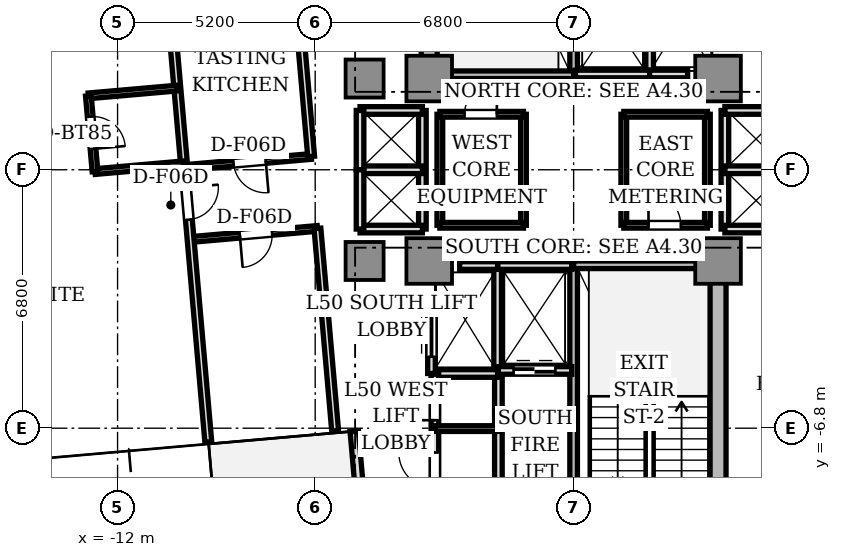
"""IFC4 building model, lengths in metres.
Left out: names, types, materials, properties, quantities, classifications, styles, units other than length and angle.
Written with IfcOpenShell. Run it as: python <this file> out.ifc"""

import sys

from ifc_helpers import new_model, si_unit, direction, frame, frame_2d, origin, origin_2d, place, context, subcontext, project, spatial, rectangle, extrude, source, transform, mapped, element, fill, save


model = new_model("IFC4")
c1 = context("Model", 3, precision=1e-05, world=origin(), true_north=direction((0.0, 1.0)))
c2 = subcontext(c1, "Body", "Model", "MODEL_VIEW")
j1 = project(units=[si_unit("LENGTHUNIT", "METRE"), si_unit("PLANEANGLEUNIT", "RADIAN")], contexts=[c1])
p1 = place(None, origin())
s1 = spatial("IfcSite", under=j1, at=p1, CompositionType="ELEMENT")
p2 = place(p1, origin())
s2 = spatial("IfcBuilding", under=s1, at=p2, CompositionType="ELEMENT")
p3 = place(p2, frame((0.0, 0.0, 181.9)))
s3 = spatial("IfcBuildingStorey", under=s2, at=p3, CompositionType="ELEMENT", Elevation=181.9)
for number, where, z_axis, x_axis in (
    (1, (-3.8, 2.85, 0.0), (0.0, 0.0, 1.0), (0.0, 1.0, 0.0)),
    (2, (3.8, -9.75, 0.0), (0.0, 0.0, 1.0), (0.0, 1.0, 0.0)),
):
    element("IfcWall", number, at=place(p3, frame(where, z_axis=z_axis, x_axis=x_axis)), inside=s3, PredefinedType="SHEAR", context=c2, shape_type="SweptSolid", body=[
        extrude(rectangle(XDim=6.9, YDim=0.42, at=frame_2d((3.45, 0.0))), origin(), (0.0, 0.0, 1.0), 3.11),
    ])
m1 = source(origin(), c2, "Body", "SweptSolid", [
    extrude(rectangle(XDim=1.2, YDim=1.2, at=origin_2d()), origin(), (0.0, 0.0, 1.0), 3.11),
])
for number, where, z_axis, x_axis in (
    (3, (-3.8, 2.4, 0.0), (0.0, 0.0, 1.0), (1.0, 0.0, 0.0)),
    (4, (3.8, 2.4, 0.0), (0.0, 0.0, 1.0), (1.0, 0.0, 0.0)),
    (5, (-3.8, -2.4, 0.0), (0.0, 0.0, 1.0), (1.0, 0.0, 0.0)),
    (6, (3.8, -2.4, 0.0), (0.0, 0.0, 1.0), (1.0, 0.0, 0.0)),
):
    element("IfcColumn", number, at=place(p3, frame(where, z_axis=z_axis, x_axis=x_axis)), inside=s3, PredefinedType="COLUMN", context=c2, shape_type="MappedRepresentation", body=[
        mapped(m1, transform((0.0, 0.0, 0.0), scale=1.0)),
    ])
m2 = source(origin(), c2, "Body", "SweptSolid", [
    extrude(rectangle(XDim=1.0, YDim=1.0, at=origin_2d()), origin(), (0.0, 0.0, 1.0), 3.11),
])
for number, where, z_axis, x_axis in (
    (7, (-5.5, 2.4, 0.0), (0.0, 0.0, 1.0), (1.0, 0.0, 0.0)),
    (8, (-5.5, -2.4, 0.0), (0.0, 0.0, 1.0), (1.0, 0.0, 0.0)),
):
    element("IfcColumn", number, at=place(p3, frame(where, z_axis=z_axis, x_axis=x_axis)), inside=s3, PredefinedType="COLUMN", context=c2, shape_type="MappedRepresentation", body=[
        mapped(m2, transform((0.0, 0.0, 0.0), scale=1.0)),
    ])
p4 = place(p3, frame((-5.772, -6.879, 0.0), z_axis=(0.0, 0.0, 1.0), x_axis=(0.087168071984, -0.996193619346, 0.0)))
e9 = element("IfcWall", 9, at=p4, inside=s3, PredefinedType="STANDARD", context=c2, shape_type="SweptSolid", body=[
    extrude(rectangle(XDim=2.7, YDim=0.22, at=frame_2d((1.35, 0.0))), origin(), (0.0, 0.0, 1.0), 3.11),
])
p5 = place(p4, frame((1.4, 0.0, 0.0)))
e10 = element("IfcOpeningElement", 10, at=p5, cuts=e9, PredefinedType="OPENING", context=c2, shape_type="SweptSolid", body=[
    extrude(rectangle(XDim=1.0, YDim=2.2, at=frame_2d((0.5, 1.1))), frame((0.0, 0.12, 0.0), z_axis=(0.0, -1.0, 0.0), x_axis=(1.0, 0.0, 0.0)), (0.0, 0.0, 1.0), 0.24),
])
p6 = place(p3, frame((0.0, 2.5, 0.0), z_axis=(0.0, 0.0, 1.0), x_axis=(0.0, 1.0, 0.0)))
e11 = element("IfcWall", 11, at=p6, inside=s3, PredefinedType="SOLIDWALL", context=c2, shape_type="SweptSolid", body=[
    extrude(rectangle(XDim=7.68, YDim=0.2, at=frame_2d((3.84, 0.0))), origin(), (0.0, 0.0, 1.0), 3.11),
])
p7 = place(p6, frame((6.36, 0.0, 0.0)))
e12 = element("IfcOpeningElement", 12, at=p7, cuts=e11, PredefinedType="OPENING", context=c2, shape_type="SweptSolid", body=[
    extrude(rectangle(XDim=1.1, YDim=2.15, at=frame_2d((0.55, 1.075))), frame((0.0, 0.11, 0.0), z_axis=(0.0, -1.0, 0.0), x_axis=(1.0, 0.0, 0.0)), (0.0, 0.0, 1.0), 0.22),
])
p8 = place(p3, frame((-3.72, 2.5, 0.0), z_axis=(0.0, 0.0, 1.0), x_axis=(1.0, 0.0, 0.0)))
e13 = element("IfcWall", 13, at=p8, inside=s3, PredefinedType="SOLIDWALL", context=c2, shape_type="SweptSolid", body=[
    extrude(rectangle(XDim=3.72, YDim=0.2, at=frame_2d((1.86, 0.0))), origin(), (0.0, 0.0, 1.0), 3.11),
])
p9 = place(p3, frame((0.0, -10.18, 0.0), z_axis=(0.0, 0.0, 1.0), x_axis=(0.0, 1.0, 0.0)))
e14 = element("IfcWall", 14, at=p9, inside=s3, PredefinedType="SOLIDWALL", context=c2, shape_type="SweptSolid", body=[
    extrude(rectangle(XDim=7.68, YDim=0.2, at=frame_2d((3.84, 0.0))), origin(), (0.0, 0.0, 1.0), 3.11),
])
p10 = place(p9, frame((0.28, 0.0, 0.0)))
e15 = element("IfcOpeningElement", 15, at=p10, cuts=e14, PredefinedType="OPENING", context=c2, shape_type="SweptSolid", body=[
    extrude(rectangle(XDim=1.1, YDim=2.15, at=frame_2d((0.55, 1.075))), frame((0.0, 0.11, 0.0), z_axis=(0.0, -1.0, 0.0), x_axis=(1.0, 0.0, 0.0)), (0.0, 0.0, 1.0), 0.22),
])
p11 = place(p3, frame((0.0, -2.5, 0.0), z_axis=(0.0, 0.0, 1.0), x_axis=(1.0, 0.0, 0.0)))
e16 = element("IfcWall", 16, at=p11, inside=s3, PredefinedType="SOLIDWALL", context=c2, shape_type="SweptSolid", body=[
    extrude(rectangle(XDim=3.72, YDim=0.2, at=frame_2d((1.86, 0.0))), origin(), (0.0, 0.0, 1.0), 3.11),
])
p12 = place(p3, frame((-1.98, -9.98, 0.0), z_axis=(0.0, 0.0, 1.0), x_axis=(0.0, 1.0, 0.0)))
e17 = element("IfcWall", 17, at=p12, inside=s3, PredefinedType="SOLIDWALL", context=c2, shape_type="SweptSolid", body=[
    extrude(rectangle(XDim=4.66, YDim=0.2, at=frame_2d((2.33, 0.0))), origin(), (0.0, 0.0, 1.0), 2.66),
])
p13 = place(p12, frame((0.2, 0.0, 0.0)))
e18 = element("IfcOpeningElement", 18, at=p13, cuts=e17, PredefinedType="OPENING", context=c2, shape_type="SweptSolid", body=[
    extrude(rectangle(XDim=0.85, YDim=2.1, at=frame_2d((0.425, 1.05))), frame((0.0, 0.11, 0.0), z_axis=(0.0, -1.0, 0.0), x_axis=(1.0, 0.0, 0.0)), (0.0, 0.0, 1.0), 0.22),
])
p14 = place(p3, frame((2.0, 2.5, 0.0), z_axis=(0.0, 0.0, 1.0), x_axis=(0.0, 1.0, 0.0)))
e19 = element("IfcWall", 19, at=p14, inside=s3, PredefinedType="SOLIDWALL", context=c2, shape_type="SweptSolid", body=[
    extrude(rectangle(XDim=2.78, YDim=0.2, at=frame_2d((1.39, 0.0))), origin(), (0.0, 0.0, 1.0), 2.66),
])
p15 = place(p3, frame((0.05, 2.52, 0.0), z_axis=(0.0, 0.0, 1.0), x_axis=(1.0, 0.0, 0.0)))
e20 = element("IfcWall", 20, at=p15, inside=s3, PredefinedType="SOLIDWALL", context=c2, shape_type="SweptSolid", body=[
    extrude(rectangle(XDim=1.95, YDim=0.2, at=frame_2d((0.975, 0.0))), origin(), (0.0, 0.0, 1.0), 2.66),
])
p16 = place(p3, frame((-2.0, -5.28, 0.0), z_axis=(0.0, 0.0, 1.0), x_axis=(0.0, 1.0, 0.0)))
e21 = element("IfcWall", 21, at=p16, inside=s3, PredefinedType="SOLIDWALL", context=c2, shape_type="SweptSolid", body=[
    extrude(rectangle(XDim=2.78, YDim=0.2, at=frame_2d((1.39, 0.0))), origin(), (0.0, 0.0, 1.0), 2.66),
])
p17 = place(p3, frame((-2.0, -2.52, 0.0), z_axis=(0.0, 0.0, 1.0), x_axis=(1.0, 0.0, 0.0)))
e22 = element("IfcWall", 22, at=p17, inside=s3, PredefinedType="SOLIDWALL", context=c2, shape_type="SweptSolid", body=[
    extrude(rectangle(XDim=1.95, YDim=0.2, at=frame_2d((0.975, 0.0))), origin(), (0.0, 0.0, 1.0), 2.66),
])
p18 = place(p3, frame((-1.98, -5.28, 0.0), z_axis=(0.0, 0.0, 1.0), x_axis=(1.0, 0.0, 0.0)))
e23 = element("IfcWall", 23, at=p18, inside=s3, PredefinedType="SOLIDWALL", context=c2, shape_type="SweptSolid", body=[
    extrude(rectangle(XDim=1.93, YDim=0.2, at=frame_2d((0.965, 0.0))), origin(), (0.0, 0.0, 1.0), 2.66),
])
p19 = place(p18, frame((0.4, 0.0, 0.0)))
e24 = element("IfcOpeningElement", 24, at=p19, cuts=e23, PredefinedType="OPENING", context=c2, shape_type="SweptSolid", body=[
    extrude(rectangle(XDim=1.1, YDim=2.2, at=frame_2d((0.55, 1.1))), frame((0.0, 0.11, 0.0), z_axis=(0.0, -1.0, 0.0), x_axis=(1.0, 0.0, 0.0)), (0.0, 0.0, 1.0), 0.22),
])
for number, where, z_axis, x_axis in (
    (25, (2.0, 2.52, 0.0), (0.0, 0.0, 1.0), (1.0, 0.0, 0.0)),
    (26, (-3.0, -2.52, 0.0), (0.0, 0.0, 1.0), (1.0, 0.0, 0.0)),
):
    element("IfcWall", number, at=place(p3, frame(where, z_axis=z_axis, x_axis=x_axis)), inside=s3, PredefinedType="SOLIDWALL", context=c2, shape_type="SweptSolid", body=[
        extrude(rectangle(XDim=1.0, YDim=0.2, at=frame_2d((0.5, 0.0))), origin(), (0.0, 0.0, 1.0), 2.66),
    ])
p20 = place(p3, frame((-3.74, -5.36, 0.0), z_axis=(0.0, 0.0, 1.0), x_axis=(1.0, 0.0, 0.0)))
e27 = element("IfcWall", 27, at=p20, inside=s3, PredefinedType="SOLIDWALL", context=c2, shape_type="SweptSolid", body=[
    extrude(rectangle(XDim=1.74, YDim=0.2, at=frame_2d((0.87, 0.0))), origin(), (0.0, 0.0, 1.0), 2.66),
])
p21 = place(p3, frame((-3.74, -5.36, 0.0), z_axis=(0.0, 0.0, 1.0), x_axis=(0.0, 1.0, 0.0)))
e28 = element("IfcWall", 28, at=p21, inside=s3, PredefinedType="SOLIDWALL", context=c2, shape_type="SweptSolid", body=[
    extrude(rectangle(XDim=2.08, YDim=0.2, at=frame_2d((1.04, 0.0))), origin(), (0.0, 0.0, 1.0), 2.66),
])
p22 = place(p21, frame((0.44, 0.0, 0.0)))
e29 = element("IfcOpeningElement", 29, at=p22, cuts=e28, PredefinedType="OPENING", context=c2, shape_type="SweptSolid", body=[
    extrude(rectangle(XDim=1.2, YDim=2.2, at=frame_2d((0.6, 1.1))), frame((0.0, 0.11, 0.0), z_axis=(0.0, -1.0, 0.0), x_axis=(1.0, 0.0, 0.0)), (0.0, 0.0, 1.0), 0.22),
])
p23 = place(p3, frame((3.98, -1.56, 0.0), z_axis=(0.0, 0.0, 1.0), x_axis=(0.0, 1.0, 0.0)))
e30 = element("IfcWall", 30, at=p23, inside=s3, PredefinedType="SOLIDWALL", context=c2, shape_type="SweptSolid", body=[
    extrude(rectangle(XDim=3.12, YDim=0.2, at=frame_2d((1.56, 0.0))), origin(), (0.0, 0.0, 1.0), 2.28),
])
for number, where, z_axis, x_axis in (
    (31, (3.98, 1.56, 0.0), (0.0, 0.0, 1.0), (1.0, 0.0, 0.0)),
    (32, (3.98, -1.56, 0.0), (0.0, 0.0, 1.0), (1.0, 0.0, 0.0)),
    (33, (3.98, 0.0, 0.0), (0.0, 0.0, 1.0), (1.0, 0.0, 0.0)),
):
    element("IfcWall", number, at=place(p3, frame(where, z_axis=z_axis, x_axis=x_axis)), inside=s3, PredefinedType="SOLIDWALL", context=c2, shape_type="SweptSolid", body=[
        extrude(rectangle(XDim=1.64, YDim=0.2, at=frame_2d((0.82, 0.0))), origin(), (0.0, 0.0, 1.0), 2.66),
    ])
p24 = place(p3, frame((-3.98, -1.56, 0.0), z_axis=(0.0, 0.0, 1.0), x_axis=(0.0, 1.0, 0.0)))
e34 = element("IfcWall", 34, at=p24, inside=s3, PredefinedType="SOLIDWALL", context=c2, shape_type="SweptSolid", body=[
    extrude(rectangle(XDim=3.12, YDim=0.2, at=frame_2d((1.56, 0.0))), origin(), (0.0, 0.0, 1.0), 2.28),
])
for number, where, z_axis, x_axis in (
    (35, (-5.62, 1.56, 0.0), (0.0, 0.0, 1.0), (1.0, 0.0, 0.0)),
    (36, (-5.62, -1.56, 0.0), (0.0, 0.0, 1.0), (1.0, 0.0, 0.0)),
    (37, (-5.62, 0.0, 0.0), (0.0, 0.0, 1.0), (1.0, 0.0, 0.0)),
):
    element("IfcWall", number, at=place(p3, frame(where, z_axis=z_axis, x_axis=x_axis)), inside=s3, PredefinedType="SOLIDWALL", context=c2, shape_type="SweptSolid", body=[
        extrude(rectangle(XDim=1.64, YDim=0.2, at=frame_2d((0.82, 0.0))), origin(), (0.0, 0.0, 1.0), 2.66),
    ])
for number, where, z_axis, x_axis in (
    (38, (-5.62, 0.0, 0.0), (0.0, 0.0, 1.0), (0.0, 1.0, 0.0)),
    (39, (-5.62, -1.56, 0.0), (0.0, 0.0, 1.0), (0.0, 1.0, 0.0)),
):
    element("IfcWall", number, at=place(p3, frame(where, z_axis=z_axis, x_axis=x_axis)), inside=s3, PredefinedType="SOLIDWALL", context=c2, shape_type="SweptSolid", body=[
        extrude(rectangle(XDim=1.56, YDim=0.2, at=frame_2d((0.78, 0.0))), origin(), (0.0, 0.0, 1.0), 2.66),
    ])
p25 = place(p3, frame((-3.65, -8.81, 0.0), z_axis=(0.0, 0.0, 1.0), x_axis=(0.0, 1.0, 0.0)))
e40 = element("IfcWall", 40, at=p25, inside=s3, PredefinedType="SOLIDWALL", context=c2, shape_type="SweptSolid", body=[
    extrude(rectangle(XDim=3.43, YDim=0.2, at=frame_2d((1.715, 0.0))), origin(), (0.0, 0.0, 1.0), 2.66),
])
p26 = place(p25, frame((0.42, 0.0, 0.0)))
e41 = element("IfcOpeningElement", 41, at=p26, cuts=e40, PredefinedType="OPENING", context=c2, shape_type="SweptSolid", body=[
    extrude(rectangle(XDim=0.95, YDim=2.15, at=frame_2d((0.475, 1.075))), frame((0.0, 0.11, 0.0), z_axis=(0.0, -1.0, 0.0), x_axis=(1.0, 0.0, 0.0)), (0.0, 0.0, 1.0), 0.22),
])
p27 = place(p25, frame((2.22, 0.0, 0.0)))
e42 = element("IfcOpeningElement", 42, at=p27, cuts=e40, PredefinedType="OPENING", context=c2, shape_type="SweptSolid", body=[
    extrude(rectangle(XDim=0.85, YDim=2.1, at=frame_2d((0.425, 1.05))), frame((0.0, 0.11, 0.0), z_axis=(0.0, -1.0, 0.0), x_axis=(1.0, 0.0, 0.0)), (0.0, 0.0, 1.0), 0.22),
])
p28 = place(p3, frame((-3.65, -6.81, 0.0), z_axis=(0.0, 0.0, 1.0), x_axis=(1.0, 0.0, 0.0)))
e43 = element("IfcWall", 43, at=p28, inside=s3, PredefinedType="PARTITIONING", context=c2, shape_type="SweptSolid", body=[
    extrude(rectangle(XDim=1.67, YDim=0.15, at=frame_2d((0.835, 0.0))), origin(), (0.0, 0.0, 1.0), 2.66),
])
p29 = place(p3, frame((-1.32, -1.46, 0.0), z_axis=(0.0, 0.0, 1.0), x_axis=(0.0, 1.0, 0.0)))
e44 = element("IfcWall", 44, at=p29, inside=s3, PredefinedType="PARTITIONING", context=c2, shape_type="SweptSolid", body=[
    extrude(rectangle(XDim=2.92, YDim=0.15, at=frame_2d((1.46, 0.0))), origin(), (0.0, 0.0, 1.0), 2.66),
])
p30 = place(p3, frame((-3.52, -1.46, 0.0), z_axis=(0.0, 0.0, 1.0), x_axis=(0.0, 1.0, 0.0)))
e45 = element("IfcWall", 45, at=p30, inside=s3, PredefinedType="PARTITIONING", context=c2, shape_type="SweptSolid", body=[
    extrude(rectangle(XDim=2.92, YDim=0.15, at=frame_2d((1.46, 0.0))), origin(), (0.0, 0.0, 1.0), 2.28),
])
p31 = place(p3, frame((-3.52, 1.46, 0.0), z_axis=(0.0, 0.0, 1.0), x_axis=(1.0, 0.0, 0.0)))
e46 = element("IfcWall", 46, at=p31, inside=s3, PredefinedType="PARTITIONING", context=c2, shape_type="SweptSolid", body=[
    extrude(rectangle(XDim=2.2, YDim=0.15, at=frame_2d((1.1, 0.0))), origin(), (0.0, 0.0, 1.0), 2.66),
])
p32 = place(p31, frame((0.65, 0.0, 0.0)))
e47 = element("IfcOpeningElement", 47, at=p32, cuts=e46, PredefinedType="OPENING", context=c2, shape_type="SweptSolid", body=[
    extrude(rectangle(XDim=0.85, YDim=2.1, at=frame_2d((0.425, 1.05))), frame((0.0, 0.085, 0.0), z_axis=(0.0, -1.0, 0.0), x_axis=(1.0, 0.0, 0.0)), (0.0, 0.0, 1.0), 0.17),
])
p33 = place(p3, frame((-3.52, -1.46, 0.0), z_axis=(0.0, 0.0, 1.0), x_axis=(1.0, 0.0, 0.0)))
e48 = element("IfcWall", 48, at=p33, inside=s3, PredefinedType="PARTITIONING", context=c2, shape_type="SweptSolid", body=[
    extrude(rectangle(XDim=2.2, YDim=0.15, at=frame_2d((1.1, 0.0))), origin(), (0.0, 0.0, 1.0), 2.66),
])
p34 = place(p3, frame((1.32, -1.46, 0.0), z_axis=(0.0, 0.0, 1.0), x_axis=(0.0, 1.0, 0.0)))
e49 = element("IfcWall", 49, at=p34, inside=s3, PredefinedType="PARTITIONING", context=c2, shape_type="SweptSolid", body=[
    extrude(rectangle(XDim=2.92, YDim=0.15, at=frame_2d((1.46, 0.0))), origin(), (0.0, 0.0, 1.0), 2.66),
])
p35 = place(p3, frame((3.52, -1.46, 0.0), z_axis=(0.0, 0.0, 1.0), x_axis=(0.0, 1.0, 0.0)))
e50 = element("IfcWall", 50, at=p35, inside=s3, PredefinedType="PARTITIONING", context=c2, shape_type="SweptSolid", body=[
    extrude(rectangle(XDim=2.92, YDim=0.15, at=frame_2d((1.46, 0.0))), origin(), (0.0, 0.0, 1.0), 2.28),
])
p36 = place(p3, frame((1.32, 1.46, 0.0), z_axis=(0.0, 0.0, 1.0), x_axis=(1.0, 0.0, 0.0)))
e51 = element("IfcWall", 51, at=p36, inside=s3, PredefinedType="PARTITIONING", context=c2, shape_type="SweptSolid", body=[
    extrude(rectangle(XDim=2.2, YDim=0.15, at=frame_2d((1.1, 0.0))), origin(), (0.0, 0.0, 1.0), 2.66),
])
p37 = place(p3, frame((1.32, -1.46, 0.0), z_axis=(0.0, 0.0, 1.0), x_axis=(1.0, 0.0, 0.0)))
e52 = element("IfcWall", 52, at=p37, inside=s3, PredefinedType="PARTITIONING", context=c2, shape_type="SweptSolid", body=[
    extrude(rectangle(XDim=2.2, YDim=0.15, at=frame_2d((1.1, 0.0))), origin(), (0.0, 0.0, 1.0), 2.66),
])
p38 = place(p37, frame((0.65, 0.0, 0.0)))
e53 = element("IfcOpeningElement", 53, at=p38, cuts=e52, PredefinedType="OPENING", context=c2, shape_type="SweptSolid", body=[
    extrude(rectangle(XDim=0.85, YDim=2.1, at=frame_2d((0.425, 1.05))), frame((0.0, 0.085, 0.0), z_axis=(0.0, -1.0, 0.0), x_axis=(1.0, 0.0, 0.0)), (0.0, 0.0, 1.0), 0.17),
])
p39 = place(p3, frame((-6.741, -1.543, 0.0), z_axis=(0.0, 0.0, 1.0), x_axis=(-0.996193954812, -0.087164238054, 0.0)))
e54 = element("IfcWall", 54, at=p39, inside=s3, PredefinedType="PARTITIONING", context=c2, shape_type="SweptSolid", body=[
    extrude(rectangle(XDim=3.35, YDim=0.15, at=frame_2d((1.675, 0.0))), origin(), (0.0, 0.0, 1.0), 2.66),
])
p40 = place(p39, frame((1.2, 0.0, 0.0)))
e55 = element("IfcOpeningElement", 55, at=p40, cuts=e54, PredefinedType="OPENING", context=c2, shape_type="SweptSolid", body=[
    extrude(rectangle(XDim=0.85, YDim=2.1, at=frame_2d((0.425, 1.05))), frame((0.0, 0.085, 0.0), z_axis=(0.0, -1.0, 0.0), x_axis=(1.0, 0.0, 0.0)), (0.0, 0.0, 1.0), 0.17),
])
p41 = place(p3, frame((-6.907, 0.349, 0.0), z_axis=(0.0, 0.0, 1.0), x_axis=(-0.996193954812, -0.087164238054, 0.0)))
e56 = element("IfcWall", 56, at=p41, inside=s3, PredefinedType="PARTITIONING", context=c2, shape_type="SweptSolid", body=[
    extrude(rectangle(XDim=3.35, YDim=0.15, at=frame_2d((1.675, 0.0))), origin(), (0.0, 0.0, 1.0), 2.66),
])
p42 = place(p41, frame((1.2, 0.0, 0.0)))
e57 = element("IfcOpeningElement", 57, at=p42, cuts=e56, PredefinedType="OPENING", context=c2, shape_type="SweptSolid", body=[
    extrude(rectangle(XDim=0.85, YDim=2.1, at=frame_2d((0.425, 1.05))), frame((0.0, 0.085, 0.0), z_axis=(0.0, -1.0, 0.0), x_axis=(1.0, 0.0, 0.0)), (0.0, 0.0, 1.0), 0.17),
])
for number, where, z_axis, x_axis in (
    (58, (-6.741, -1.543, 0.0), (0.0, 0.0, 1.0), (0.087, -0.996, 0.0)),
    (59, (-7.373, 5.679, 0.0), (0.0, 0.0, 1.0), (0.087, -0.996, 0.0)),
):
    element("IfcWall", number, at=place(p3, frame(where, z_axis=z_axis, x_axis=x_axis)), inside=s3, PredefinedType="PARTITIONING", context=c2, shape_type="SweptSolid", body=[
        extrude(rectangle(XDim=5.35, YDim=0.18, at=frame_2d((2.675, 0.0))), origin(), (0.0, 0.0, 1.0), 2.66),
    ])
p43 = place(p3, frame((-10.71, 5.387, 0.0), z_axis=(0.0, 0.0, 1.0), x_axis=(0.087154691724, -0.996194790044, 0.0)))
e60 = element("IfcWall", 60, at=p43, inside=s3, PredefinedType="PARTITIONING", context=c2, shape_type="SweptSolid", body=[
    extrude(rectangle(XDim=12.6, YDim=0.18, at=frame_2d((6.3, 0.0))), origin(), (0.0, 0.0, 1.0), 2.66),
])
p44 = place(p43, frame((5.875, 0.0, 0.0)))
e61 = element("IfcOpeningElement", 61, at=p44, cuts=e60, PredefinedType="OPENING", context=c2, shape_type="SweptSolid", body=[
    extrude(rectangle(XDim=0.85, YDim=2.1, at=frame_2d((0.425, 1.05))), frame((0.0, 0.1, 0.0), z_axis=(0.0, -1.0, 0.0), x_axis=(1.0, 0.0, 0.0)), (0.0, 0.0, 1.0), 0.2),
])
for number, where, z_axis, x_axis in (
    (62, (-10.253, 0.157, 0.0), (0.0, 0.0, 1.0), (-0.996, -0.087, 0.0)),
    (63, (-10.427, 2.149, 0.0), (0.0, 0.0, 1.0), (-0.996, -0.087, 0.0)),
):
    element("IfcWall", number, at=place(p3, frame(where, z_axis=z_axis, x_axis=x_axis)), inside=s3, PredefinedType="PARTITIONING", context=c2, shape_type="SweptSolid", body=[
        extrude(rectangle(XDim=2.35, YDim=0.15, at=frame_2d((1.175, 0.0))), origin(), (0.0, 0.0, 1.0), 2.66),
    ])
p45 = place(p3, frame((-12.768, 1.945, 0.0), z_axis=(0.0, 0.0, 1.0), x_axis=(0.087156350505, -0.99619464492, 0.0)))
e64 = element("IfcWall", 64, at=p45, inside=s3, PredefinedType="PARTITIONING", context=c2, shape_type="SweptSolid", body=[
    extrude(rectangle(XDim=2.0, YDim=0.15, at=frame_2d((1.0, 0.0))), origin(), (0.0, 0.0, 1.0), 2.66),
])
p46 = place(p45, frame((0.55, 0.0, 0.0)))
e65 = element("IfcOpeningElement", 65, at=p46, cuts=e64, PredefinedType="OPENING", context=c2, shape_type="SweptSolid", body=[
    extrude(rectangle(XDim=0.85, YDim=2.1, at=frame_2d((0.425, 1.05))), frame((0.0, 0.085, 0.0), z_axis=(0.0, -1.0, 0.0), x_axis=(1.0, 0.0, 0.0)), (0.0, 0.0, 1.0), 0.17),
])
m3 = source(origin(), c2, "Body", "SweptSolid", [
    extrude(rectangle(XDim=1.1, YDim=0.05, at=origin_2d()), origin(), (0.0, 0.0, 1.0), 2.2),
])
p47 = place(p19, frame((0.55, 0.0, 0.0)))
e66 = element("IfcDoor", 66, at=p47, inside=s3, OperationType="DOUBLE_DOOR_SLIDING", PredefinedType="DOOR", context=c2, shape_type="MappedRepresentation", body=[
    mapped(m3, transform((0.0, 0.0, 0.0), scale=1.0)),
])
fill(e24, e66)
m4 = source(origin(), c2, "Body", "SweptSolid", [
    extrude(rectangle(XDim=1.2, YDim=0.05, at=origin_2d()), origin(), (0.0, 0.0, 1.0), 2.2),
])
p48 = place(p22, frame((0.6, 0.0, 0.0)))
e67 = element("IfcDoor", 67, at=p48, inside=s3, OperationType="DOUBLE_DOOR_SLIDING", PredefinedType="DOOR", context=c2, shape_type="MappedRepresentation", body=[
    mapped(m4, transform((0.0, 0.0, 0.0), scale=1.0)),
])
fill(e29, e67)
m5 = source(origin(), c2, "Body", "SweptSolid", [
    extrude(rectangle(XDim=0.95, YDim=0.05, at=origin_2d()), origin(), (0.0, 0.0, 1.0), 2.15),
])
p49 = place(p26, frame((0.475, 0.0, 0.0)))
e68 = element("IfcDoor", 68, at=p49, inside=s3, OperationType="SINGLE_SWING_RIGHT", PredefinedType="DOOR", context=c2, shape_type="MappedRepresentation", body=[
    mapped(m5, transform((0.0, 0.0, 0.0), scale=1.0)),
])
fill(e41, e68)
m6 = source(origin(), c2, "Body", "SweptSolid", [
    extrude(rectangle(XDim=0.85, YDim=0.05, at=origin_2d()), origin(), (0.0, 0.0, 1.0), 2.1),
])
p50 = place(p27, frame((0.425, 0.0, 0.0)))
e69 = element("IfcDoor", 69, at=p50, inside=s3, OperationType="SINGLE_SWING_LEFT", PredefinedType="DOOR", context=c2, shape_type="MappedRepresentation", body=[
    mapped(m6, transform((0.0, 0.0, 0.0), scale=1.0)),
])
fill(e42, e69)
p51 = place(p32, frame((0.425, 0.0, 0.0)))
e70 = element("IfcDoor", 70, at=p51, inside=s3, OperationType="SINGLE_SWING_RIGHT", PredefinedType="DOOR", context=c2, shape_type="MappedRepresentation", body=[
    mapped(m6, transform((0.0, 0.0, 0.0), scale=1.0)),
])
fill(e47, e70)
p52 = place(p38, frame((0.425, 0.0, 0.0)))
e71 = element("IfcDoor", 71, at=p52, inside=s3, OperationType="SINGLE_SWING_LEFT", PredefinedType="DOOR", context=c2, shape_type="MappedRepresentation", body=[
    mapped(m6, transform((0.0, 0.0, 0.0), scale=1.0)),
])
fill(e53, e71)
p53 = place(p40, frame((0.425, 0.0, 0.0)))
e72 = element("IfcDoor", 72, at=p53, inside=s3, OperationType="SINGLE_SWING_RIGHT", PredefinedType="DOOR", context=c2, shape_type="MappedRepresentation", body=[
    mapped(m6, transform((0.0, 0.0, 0.0), scale=1.0)),
])
fill(e55, e72)
p54 = place(p42, frame((0.425, 0.0, 0.0)))
e73 = element("IfcDoor", 73, at=p54, inside=s3, OperationType="SINGLE_SWING_LEFT", PredefinedType="DOOR", context=c2, shape_type="MappedRepresentation", body=[
    mapped(m6, transform((0.0, 0.0, 0.0), scale=1.0)),
])
fill(e57, e73)
p55 = place(p46, frame((0.425, 0.0, 0.0)))
e74 = element("IfcDoor", 74, at=p55, inside=s3, OperationType="SINGLE_SWING_RIGHT", PredefinedType="DOOR", context=c2, shape_type="MappedRepresentation", body=[
    mapped(m6, transform((0.0, 0.0, 0.0), scale=1.0)),
])
fill(e65, e74)
p56 = place(p44, frame((0.425, 0.0, 0.0)))
e75 = element("IfcDoor", 75, at=p56, inside=s3, OperationType="SINGLE_SWING_LEFT", PredefinedType="DOOR", context=c2, shape_type="MappedRepresentation", body=[
    mapped(m6, transform((0.0, 0.0, 0.0), scale=1.0)),
])
fill(e61, e75)
save(model, sys.argv[1])
